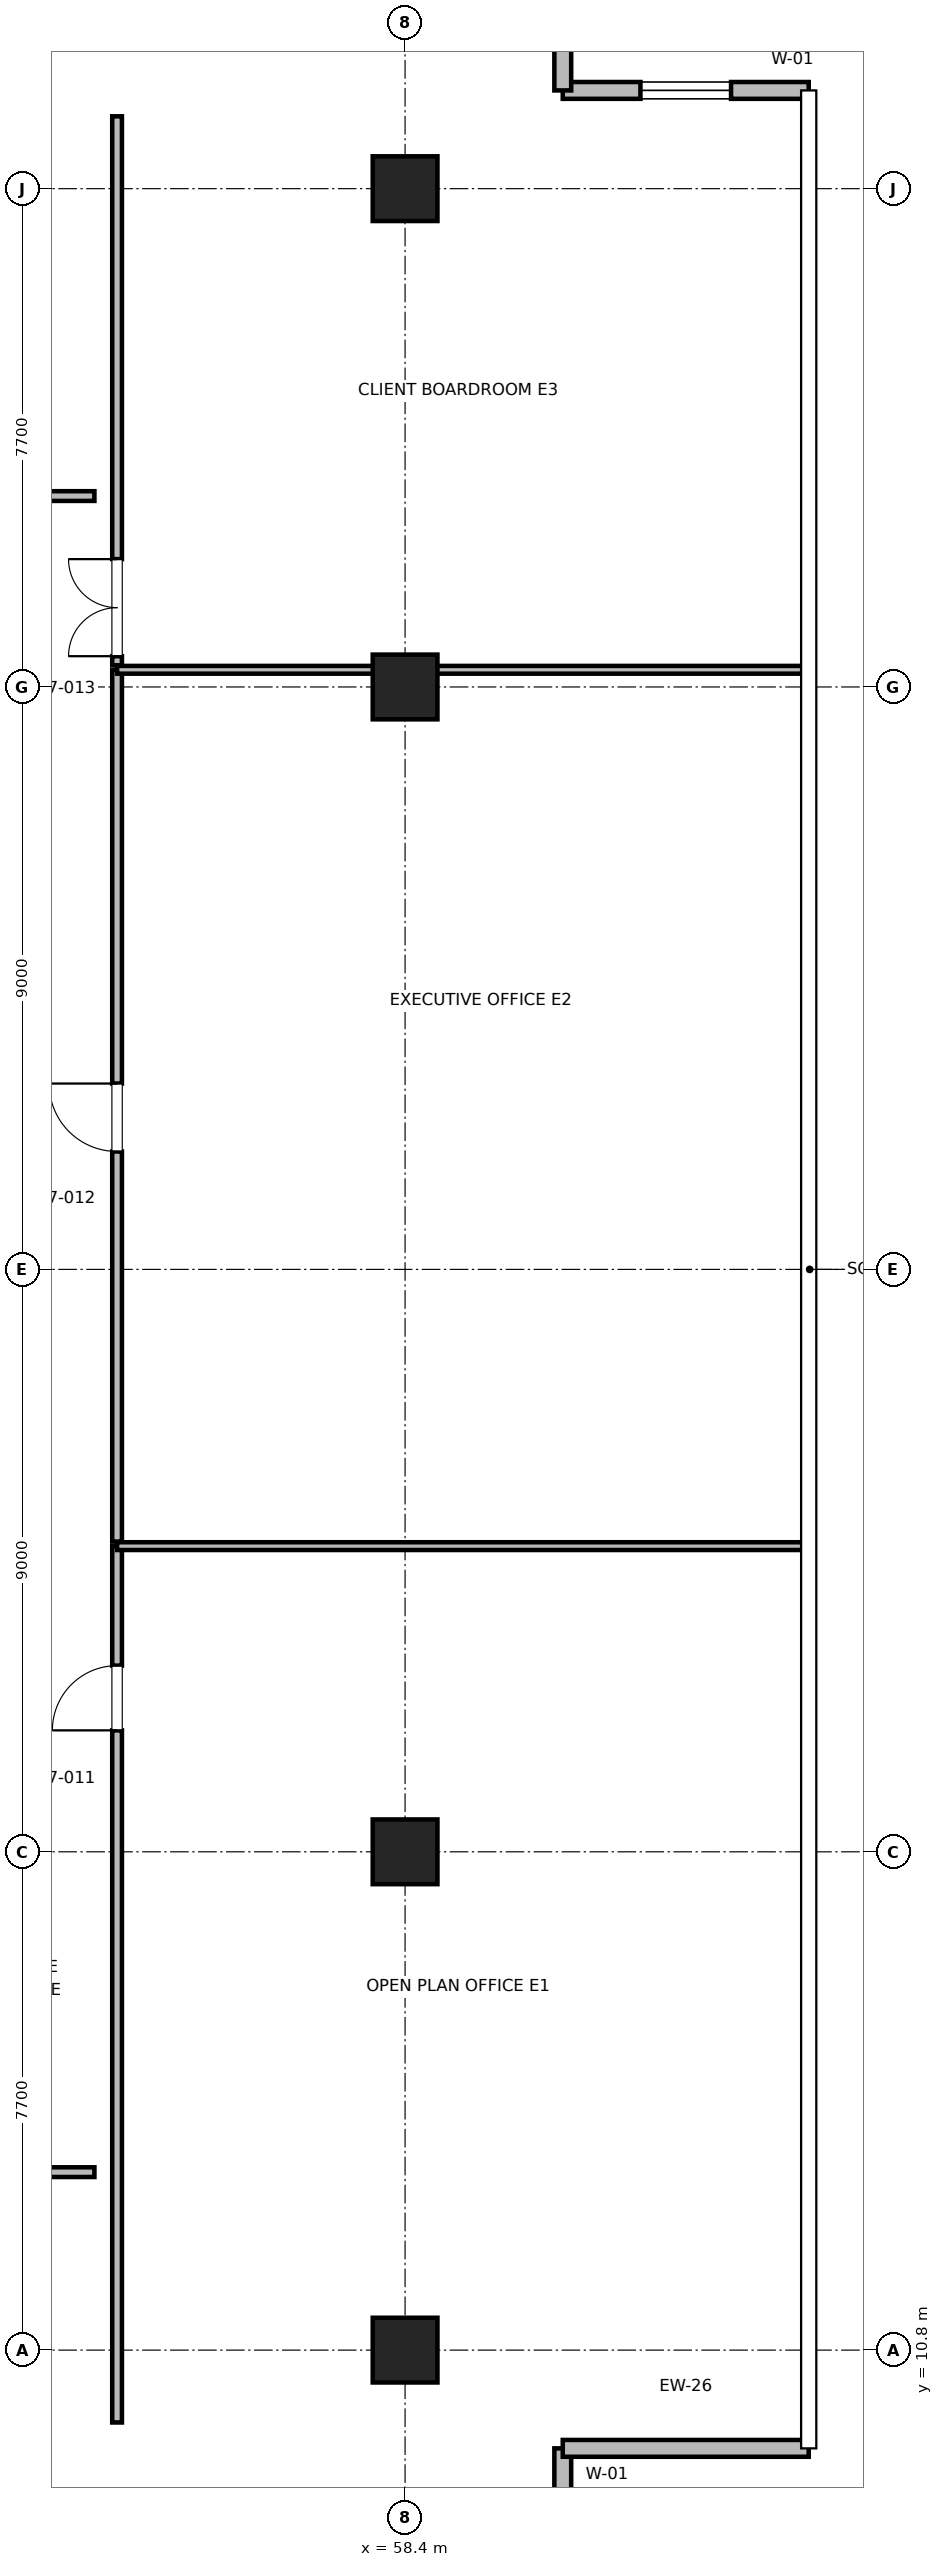
"""IFC4 building model, lengths in metres.
Left out: names, types, materials, properties, quantities, classifications, styles, units other than length and angle.
Written with IfcOpenShell. Run it as: python <this file> out.ifc"""

import sys

from ifc_helpers import new_model, si_unit, direction, frame, frame_2d, origin, origin_2d, place, context, subcontext, project, spatial, rectangle, extrude, element, fill, save


model = new_model("IFC4")
c1 = context("Model", 3, precision=1e-05, world=origin(), true_north=direction((0.0, 1.0)))
c2 = subcontext(c1, "Body", "Model", "MODEL_VIEW")
j1 = project(units=[si_unit("LENGTHUNIT", "METRE"), si_unit("PLANEANGLEUNIT", "RADIAN")], contexts=[c1])
p1 = place(None, origin())
s1 = spatial("IfcSite", under=j1, at=p1, CompositionType="ELEMENT")
p2 = place(p1, origin())
s2 = spatial("IfcBuilding", under=s1, at=p2, CompositionType="ELEMENT")
p3 = place(p2, frame((0.0, 0.0, 330.8)))
s3 = spatial("IfcBuildingStorey", under=s2, at=p3, CompositionType="ELEMENT", Elevation=330.8)
for number, where, z_axis, x_axis in (
    (1, (58.4, 18.5, 0.0), (0.0, 0.0, 1.0), (1.0, 0.0, 0.0)),
    (2, (58.4, 36.5, 0.0), (0.0, 0.0, 1.0), (1.0, 0.0, 0.0)),
    (3, (58.4, 10.8, 0.0), (0.0, 0.0, 1.0), (1.0, 0.0, 0.0)),
    (4, (58.4, 44.2, 0.0), (0.0, 0.0, 1.0), (1.0, 0.0, 0.0)),
):
    element("IfcColumn", number, at=place(p3, frame(where, z_axis=z_axis, x_axis=x_axis)), inside=s3, PredefinedType="COLUMN", context=c2, shape_type="SweptSolid", body=[
        extrude(rectangle(XDim=1.0, YDim=1.0, at=origin_2d()), origin(), (0.0, 0.0, 1.0), 4.0),
    ])
p4 = place(p3, frame((60.836, 5.982, 0.0), z_axis=(0.0, 0.0, 1.0), x_axis=(0.0, 1.0, 0.0)))
e5 = element("IfcWall", 5, at=p4, inside=s3, PredefinedType="PARAPET", context=c2, shape_type="SweptSolid", body=[
    extrude(rectangle(XDim=3.3, YDim=0.26, at=frame_2d((1.65, 0.0))), origin(), (0.0, 0.0, 1.0), 3.785),
])
p5 = place(p4, frame((0.95, 0.0, 0.85)))
e6 = element("IfcOpeningElement", 6, at=p5, cuts=e5, PredefinedType="OPENING", context=c2, shape_type="SweptSolid", body=[
    extrude(rectangle(XDim=1.4, YDim=2.0, at=frame_2d((0.7, 1.0))), frame((0.0, 0.13, 0.0), z_axis=(0.0, -1.0, 0.0), x_axis=(1.0, 0.0, 0.0)), (0.0, 0.0, 1.0), 0.26),
])
p6 = place(p3, frame((60.836, 9.282, 0.0), z_axis=(0.0, 0.0, 1.0), x_axis=(1.0, 0.0, 0.0)))
e7 = element("IfcWall", 7, at=p6, inside=s3, PredefinedType="PARAPET", context=c2, shape_type="SweptSolid", body=[
    extrude(rectangle(XDim=3.8, YDim=0.26, at=frame_2d((1.9, 0.0))), origin(), (0.0, 0.0, 1.0), 3.785),
])
p7 = place(p3, frame((64.636, 45.718, 0.0), z_axis=(0.0, 0.0, 1.0), x_axis=(-1.0, 0.0, 0.0)))
e8 = element("IfcWall", 8, at=p7, inside=s3, PredefinedType="PARAPET", context=c2, shape_type="SweptSolid", body=[
    extrude(rectangle(XDim=3.8, YDim=0.26, at=frame_2d((1.9, 0.0))), origin(), (0.0, 0.0, 1.0), 3.785),
])
p8 = place(p7, frame((1.2, 0.0, 0.85)))
e9 = element("IfcOpeningElement", 9, at=p8, cuts=e8, PredefinedType="OPENING", context=c2, shape_type="SweptSolid", body=[
    extrude(rectangle(XDim=1.4, YDim=2.0, at=frame_2d((0.7, 1.0))), frame((0.0, 0.13, 0.0), z_axis=(0.0, -1.0, 0.0), x_axis=(1.0, 0.0, 0.0)), (0.0, 0.0, 1.0), 0.26),
])
p9 = place(p3, frame((60.836, 45.718, 0.0), z_axis=(0.0, 0.0, 1.0), x_axis=(0.0, 1.0, 0.0)))
e10 = element("IfcWall", 10, at=p9, inside=s3, PredefinedType="PARAPET", context=c2, shape_type="SweptSolid", body=[
    extrude(rectangle(XDim=3.3, YDim=0.26, at=frame_2d((1.65, 0.0))), origin(), (0.0, 0.0, 1.0), 3.785),
])
p10 = place(p3, frame((48.502, 39.45, 0.0), z_axis=(0.0, 0.0, 1.0), x_axis=(1.0, 0.0, 0.0)))
e11 = element("IfcWall", 11, at=p10, inside=s3, PredefinedType="PARTITIONING", context=c2, shape_type="SweptSolid", body=[
    extrude(rectangle(XDim=5.098, YDim=0.15, at=frame_2d((2.549, 0.0))), origin(), (0.0, 0.0, 1.0), 2.85),
])
p11 = place(p10, frame((1.999, 0.0, 0.0)))
e12 = element("IfcOpeningElement", 12, at=p11, cuts=e11, PredefinedType="OPENING", context=c2, shape_type="SweptSolid", body=[
    extrude(rectangle(XDim=1.0, YDim=2.15, at=frame_2d((0.5, 1.075))), frame((0.0, 0.075, 0.0), z_axis=(0.0, -1.0, 0.0), x_axis=(1.0, 0.0, 0.0)), (0.0, 0.0, 1.0), 0.15),
])
p12 = place(p3, frame((48.23, 13.55, 0.0), z_axis=(0.0, 0.0, 1.0), x_axis=(1.0, 0.0, 0.0)))
e13 = element("IfcWall", 13, at=p12, inside=s3, PredefinedType="PARTITIONING", context=c2, shape_type="SweptSolid", body=[
    extrude(rectangle(XDim=5.37, YDim=0.15, at=frame_2d((2.685, 0.0))), origin(), (0.0, 0.0, 1.0), 2.85),
])
p13 = place(p12, frame((2.135, 0.0, 0.0)))
e14 = element("IfcOpeningElement", 14, at=p13, cuts=e13, PredefinedType="OPENING", context=c2, shape_type="SweptSolid", body=[
    extrude(rectangle(XDim=1.0, YDim=2.15, at=frame_2d((0.5, 1.075))), frame((0.0, 0.075, 0.0), z_axis=(0.0, -1.0, 0.0), x_axis=(1.0, 0.0, 0.0)), (0.0, 0.0, 1.0), 0.15),
])
p14 = place(p3, frame((53.95, 9.682, 0.0), z_axis=(0.0, 0.0, 1.0), x_axis=(0.0, 1.0, 0.0)))
e15 = element("IfcWall", 15, at=p14, inside=s3, PredefinedType="PARTITIONING", context=c2, shape_type="SweptSolid", body=[
    extrude(rectangle(XDim=13.542, YDim=0.15, at=frame_2d((6.771, 0.0))), origin(), (0.0, 0.0, 1.0), 2.85),
])
p15 = place(p14, frame((10.695, 0.0, 0.0)))
e16 = element("IfcOpeningElement", 16, at=p15, cuts=e15, PredefinedType="OPENING", context=c2, shape_type="SweptSolid", body=[
    extrude(rectangle(XDim=1.0, YDim=2.15, at=frame_2d((0.5, 1.075))), frame((0.0, 0.075, 0.0), z_axis=(0.0, -1.0, 0.0), x_axis=(1.0, 0.0, 0.0)), (0.0, 0.0, 1.0), 0.15),
])
p16 = place(p3, frame((53.95, 23.224, 0.0), z_axis=(0.0, 0.0, 1.0), x_axis=(1.0, 0.0, 0.0)))
e17 = element("IfcWall", 17, at=p16, inside=s3, PredefinedType="PARTITIONING", context=c2, shape_type="SweptSolid", body=[
    extrude(rectangle(XDim=10.586, YDim=0.12, at=frame_2d((5.293, 0.0))), origin(), (0.0, 0.0, 1.0), 2.85),
])
p17 = place(p3, frame((53.95, 23.294, 0.0), z_axis=(0.0, 0.0, 1.0), x_axis=(0.0, 1.0, 0.0)))
e18 = element("IfcWall", 18, at=p17, inside=s3, PredefinedType="PARTITIONING", context=c2, shape_type="SweptSolid", body=[
    extrude(rectangle(XDim=13.472, YDim=0.15, at=frame_2d((6.736, 0.0))), origin(), (0.0, 0.0, 1.0), 2.85),
])
p18 = place(p17, frame((6.028, 0.0, 0.0)))
e19 = element("IfcOpeningElement", 19, at=p18, cuts=e18, PredefinedType="OPENING", context=c2, shape_type="SweptSolid", body=[
    extrude(rectangle(XDim=1.05, YDim=2.2, at=frame_2d((0.525, 1.1))), frame((0.0, 0.075, 0.0), z_axis=(0.0, -1.0, 0.0), x_axis=(1.0, 0.0, 0.0)), (0.0, 0.0, 1.0), 0.15),
])
p19 = place(p3, frame((53.95, 36.765, 0.0), z_axis=(0.0, 0.0, 1.0), x_axis=(1.0, 0.0, 0.0)))
e20 = element("IfcWall", 20, at=p19, inside=s3, PredefinedType="PARTITIONING", context=c2, shape_type="SweptSolid", body=[
    extrude(rectangle(XDim=10.586, YDim=0.12, at=frame_2d((5.293, 0.0))), origin(), (0.0, 0.0, 1.0), 2.85),
])
p20 = place(p3, frame((53.95, 36.835, 0.0), z_axis=(0.0, 0.0, 1.0), x_axis=(0.0, 1.0, 0.0)))
e21 = element("IfcWall", 21, at=p20, inside=s3, PredefinedType="PARTITIONING", context=c2, shape_type="SweptSolid", body=[
    extrude(rectangle(XDim=8.483, YDim=0.15, at=frame_2d((4.241, 0.0))), origin(), (0.0, 0.0, 1.0), 2.85),
])
p21 = place(p20, frame((0.14, 0.0, 0.0)))
e22 = element("IfcOpeningElement", 22, at=p21, cuts=e21, PredefinedType="OPENING", context=c2, shape_type="SweptSolid", body=[
    extrude(rectangle(XDim=1.5, YDim=2.25, at=frame_2d((0.75, 1.125))), frame((0.0, 0.075, 0.0), z_axis=(0.0, -1.0, 0.0), x_axis=(1.0, 0.0, 0.0)), (0.0, 0.0, 1.0), 0.15),
])
p22 = place(p8, origin())
e23 = element("IfcWindow", 23, at=p22, inside=s3, PartitioningType="SINGLE_PANEL", PredefinedType="WINDOW", context=c2, shape_type="SweptSolid", body=[
    extrude(rectangle(XDim=1.4, YDim=2.0, at=frame_2d((0.7, 1.0))), frame((0.0, 0.03, 0.0), z_axis=(0.0, -1.0, 0.0), x_axis=(1.0, 0.0, 0.0)), (0.0, 0.0, 1.0), 0.06),
])
fill(e9, e23)
p23 = place(p15, origin())
e24 = element("IfcDoor", 24, at=p23, inside=s3, OperationType="SINGLE_SWING_LEFT", PredefinedType="DOOR", context=c2, shape_type="SweptSolid", body=[
    extrude(rectangle(XDim=1.0, YDim=2.15, at=frame_2d((0.5, 1.075))), frame((0.0, 0.025, 0.0), z_axis=(0.0, -1.0, 0.0), x_axis=(1.0, 0.0, 0.0)), (0.0, 0.0, 1.0), 0.05),
])
fill(e16, e24)
p24 = place(p18, origin())
e25 = element("IfcDoor", 25, at=p24, inside=s3, OperationType="SINGLE_SWING_RIGHT", PredefinedType="DOOR", context=c2, shape_type="SweptSolid", body=[
    extrude(rectangle(XDim=1.05, YDim=2.2, at=frame_2d((0.525, 1.1))), frame((0.0, 0.025, 0.0), z_axis=(0.0, -1.0, 0.0), x_axis=(1.0, 0.0, 0.0)), (0.0, 0.0, 1.0), 0.05),
])
fill(e19, e25)
p25 = place(p21, origin())
e26 = element("IfcDoor", 26, at=p25, inside=s3, OperationType="DOUBLE_DOOR_SINGLE_SWING", PredefinedType="DOOR", context=c2, shape_type="SweptSolid", body=[
    extrude(rectangle(XDim=1.5, YDim=2.25, at=frame_2d((0.75, 1.125))), frame((0.0, 0.025, 0.0), z_axis=(0.0, -1.0, 0.0), x_axis=(1.0, 0.0, 0.0)), (0.0, 0.0, 1.0), 0.05),
])
fill(e22, e26)
save(model, sys.argv[1])
